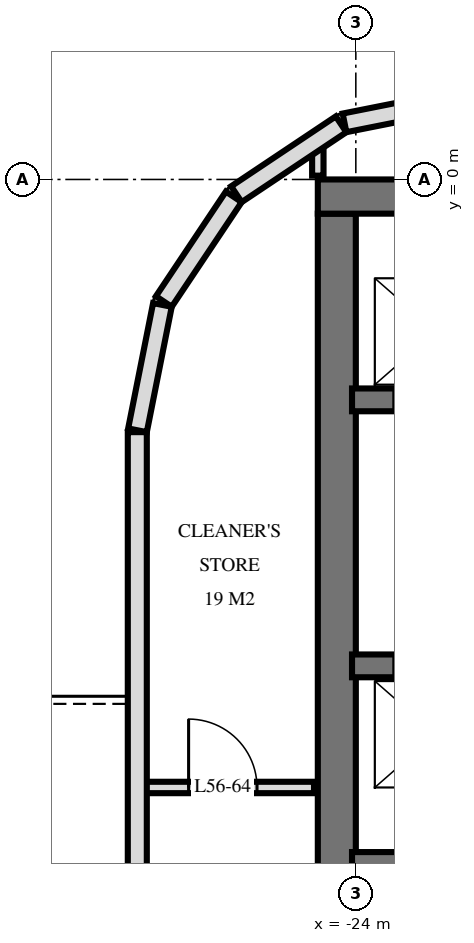
"""IFC4 building model, lengths in metres.
Left out: names, types, materials, properties, quantities, classifications, styles, units other than length and angle.
Written with IfcOpenShell. Run it as: python <this file> out.ifc"""

import sys

from ifc_helpers import new_model, si_unit, direction, frame, frame_2d, origin, place, context, subcontext, project, spatial, rectangle, extrude, element, fill, save


model = new_model("IFC4")
c1 = context("Model", 3, precision=1e-05, world=origin(), true_north=direction((0.0, 1.0)))
c2 = subcontext(c1, "Body", "Model", "MODEL_VIEW")
j1 = project(units=[si_unit("LENGTHUNIT", "METRE"), si_unit("PLANEANGLEUNIT", "RADIAN")], contexts=[c1])
p1 = place(None, origin())
s1 = spatial("IfcSite", under=j1, at=p1, CompositionType="ELEMENT")
p2 = place(p1, origin())
s2 = spatial("IfcBuilding", under=s1, at=p2, CompositionType="ELEMENT")
p3 = place(p2, frame((0.0, 0.0, 215.1)))
s3 = spatial("IfcBuildingStorey", under=s2, at=p3, CompositionType="ELEMENT", Elevation=215.1)
p4 = place(p3, frame((-24.5, -0.225, 0.0), z_axis=(0.0, 0.0, 1.0), x_axis=(1.0, 0.0, 0.0)))
e1 = element("IfcWall", 1, at=p4, inside=s3, PredefinedType="SHEAR", context=c2, shape_type="SweptSolid", body=[
    extrude(rectangle(XDim=14.5, YDim=0.45, at=frame_2d((7.25, 0.0))), origin(), (0.0, 0.0, 1.0), 3.5),
])
p5 = place(p3, frame((-24.25, -14.55, 0.0), z_axis=(0.0, 0.0, 1.0), x_axis=(0.0, 1.0, 0.0)))
e2 = element("IfcWall", 2, at=p5, inside=s3, PredefinedType="SHEAR", context=c2, shape_type="SweptSolid", body=[
    extrude(rectangle(XDim=14.1, YDim=0.5, at=frame_2d((7.05, 0.0))), origin(), (0.0, 0.0, 1.0), 3.5),
])
p6 = place(p3, frame((-24.05, -2.9, 0.0), z_axis=(0.0, 0.0, 1.0), x_axis=(1.0, 0.0, 0.0)))
e3 = element("IfcWall", 3, at=p6, inside=s3, PredefinedType="SHEAR", context=c2, shape_type="SweptSolid", body=[
    extrude(rectangle(XDim=13.7, YDim=0.3, at=frame_2d((6.85, 0.0))), origin(), (0.0, 0.0, 1.0), 3.5),
])
p7 = place(p6, frame((0.55, 0.0, 0.0)))
e4 = element("IfcOpeningElement", 4, at=p7, cuts=e3, PredefinedType="OPENING", context=c2, shape_type="SweptSolid", body=[
    extrude(rectangle(XDim=1.1, YDim=2.1, at=frame_2d((0.55, 1.05))), frame((0.0, 0.16, 0.0), z_axis=(0.0, -1.0, 0.0), x_axis=(1.0, 0.0, 0.0)), (0.0, 0.0, 1.0), 0.32),
])
p8 = place(p6, frame((6.863, 0.0, 0.0)))
e5 = element("IfcOpeningElement", 5, at=p8, cuts=e3, PredefinedType="OPENING", context=c2, shape_type="SweptSolid", body=[
    extrude(rectangle(XDim=0.9, YDim=2.1, at=frame_2d((0.45, 1.05))), frame((0.0, 0.16, 0.0), z_axis=(0.0, -1.0, 0.0), x_axis=(1.0, 0.0, 0.0)), (0.0, 0.0, 1.0), 0.32),
])
p9 = place(p6, frame((5.438, 0.0, 0.0)))
e6 = element("IfcOpeningElement", 6, at=p9, cuts=e3, PredefinedType="OPENING", context=c2, shape_type="SweptSolid", body=[
    extrude(rectangle(XDim=0.9, YDim=2.1, at=frame_2d((0.45, 1.05))), frame((0.0, 0.16, 0.0), z_axis=(0.0, -1.0, 0.0), x_axis=(1.0, 0.0, 0.0)), (0.0, 0.0, 1.0), 0.32),
])
p10 = place(p6, frame((11.85, 0.0, 0.0)))
e7 = element("IfcOpeningElement", 7, at=p10, cuts=e3, PredefinedType="OPENING", context=c2, shape_type="SweptSolid", body=[
    extrude(rectangle(XDim=1.0, YDim=2.1, at=frame_2d((0.5, 1.05))), frame((0.0, 0.16, 0.0), z_axis=(0.0, -1.0, 0.0), x_axis=(1.0, 0.0, 0.0)), (0.0, 0.0, 1.0), 0.32),
])
p11 = place(p6, frame((9.562, 0.0, 0.0)))
e8 = element("IfcOpeningElement", 8, at=p11, cuts=e3, PredefinedType="OPENING", context=c2, shape_type="SweptSolid", body=[
    extrude(rectangle(XDim=1.0, YDim=2.1, at=frame_2d((0.5, 1.05))), frame((0.0, 0.16, 0.0), z_axis=(0.0, -1.0, 0.0), x_axis=(1.0, 0.0, 0.0)), (0.0, 0.0, 1.0), 0.32),
])
p12 = place(p6, frame((8.137, 0.0, 0.0)))
e9 = element("IfcOpeningElement", 9, at=p12, cuts=e3, PredefinedType="OPENING", context=c2, shape_type="SweptSolid", body=[
    extrude(rectangle(XDim=1.0, YDim=2.1, at=frame_2d((0.5, 1.05))), frame((0.0, 0.16, 0.0), z_axis=(0.0, -1.0, 0.0), x_axis=(1.0, 0.0, 0.0)), (0.0, 0.0, 1.0), 0.32),
])
p13 = place(p6, frame((3.0, 0.0, 0.0)))
e10 = element("IfcOpeningElement", 10, at=p13, cuts=e3, PredefinedType="OPENING", context=c2, shape_type="SweptSolid", body=[
    extrude(rectangle(XDim=1.0, YDim=2.1, at=frame_2d((0.5, 1.05))), frame((0.0, 0.16, 0.0), z_axis=(0.0, -1.0, 0.0), x_axis=(1.0, 0.0, 0.0)), (0.0, 0.0, 1.0), 0.32),
])
p14 = place(p3, frame((-24.05, -6.4, 0.0), z_axis=(0.0, 0.0, 1.0), x_axis=(1.0, 0.0, 0.0)))
e11 = element("IfcWall", 11, at=p14, inside=s3, PredefinedType="SHEAR", context=c2, shape_type="SweptSolid", body=[
    extrude(rectangle(XDim=13.7, YDim=0.3, at=frame_2d((6.85, 0.0))), origin(), (0.0, 0.0, 1.0), 3.5),
])
p15 = place(p14, frame((0.55, 0.0, 0.0)))
e12 = element("IfcOpeningElement", 12, at=p15, cuts=e11, PredefinedType="OPENING", context=c2, shape_type="SweptSolid", body=[
    extrude(rectangle(XDim=1.1, YDim=2.1, at=frame_2d((0.55, 1.05))), frame((0.0, 0.16, 0.0), z_axis=(0.0, -1.0, 0.0), x_axis=(1.0, 0.0, 0.0)), (0.0, 0.0, 1.0), 0.32),
])
p16 = place(p14, frame((5.8, 0.0, 0.0)))
e13 = element("IfcOpeningElement", 13, at=p16, cuts=e11, PredefinedType="OPENING", context=c2, shape_type="SweptSolid", body=[
    extrude(rectangle(XDim=1.1, YDim=2.1, at=frame_2d((0.55, 1.05))), frame((0.0, 0.16, 0.0), z_axis=(0.0, -1.0, 0.0), x_axis=(1.0, 0.0, 0.0)), (0.0, 0.0, 1.0), 0.32),
])
p17 = place(p3, frame((-24.05, -9.0, 0.0), z_axis=(0.0, 0.0, 1.0), x_axis=(1.0, 0.0, 0.0)))
e14 = element("IfcWall", 14, at=p17, inside=s3, PredefinedType="SHEAR", context=c2, shape_type="SweptSolid", body=[
    extrude(rectangle(XDim=13.7, YDim=0.3, at=frame_2d((6.85, 0.0))), origin(), (0.0, 0.0, 1.0), 3.5),
])
p18 = place(p17, frame((8.8, 0.0, 0.0)))
e15 = element("IfcOpeningElement", 15, at=p18, cuts=e14, PredefinedType="OPENING", context=c2, shape_type="SweptSolid", body=[
    extrude(rectangle(XDim=1.1, YDim=2.1, at=frame_2d((0.55, 1.05))), frame((0.0, 0.16, 0.0), z_axis=(0.0, -1.0, 0.0), x_axis=(1.0, 0.0, 0.0)), (0.0, 0.0, 1.0), 0.32),
])
p19 = place(p3, frame((-22.5, 1.073, 0.0), z_axis=(0.0, 0.0, 1.0), x_axis=(-0.980803419081, -0.194999110559, 0.0)))
e16 = element("IfcWall", 16, at=p19, inside=s3, PredefinedType="SOLIDWALL", context=c2, shape_type="SweptSolid", body=[
    extrude(rectangle(XDim=1.681, YDim=0.25, at=frame_2d((0.841, 0.0))), origin(), (0.0, 0.0, 1.0), 3.22),
])
for number, where, z_axis, x_axis in (
    (17, (-24.194, 0.726, 0.0), (0.0, 0.0, 1.0), (-0.831, -0.556, 0.0)),
    (18, (-25.606, -0.229, 0.0), (0.0, 0.0, 1.0), (-0.556, -0.831, 0.0)),
):
    element("IfcWall", number, at=place(p3, frame(where, z_axis=z_axis, x_axis=x_axis)), inside=s3, PredefinedType="SOLIDWALL", context=c2, shape_type="SweptSolid", body=[
        extrude(rectangle(XDim=1.656, YDim=0.25, at=frame_2d((0.828, 0.0))), origin(), (0.0, 0.0, 1.0), 3.22),
    ])
p20 = place(p3, frame((-26.545, -1.651, 0.0), z_axis=(0.0, 0.0, 1.0), x_axis=(-0.194999110559, -0.980803419081, 0.0)))
e19 = element("IfcWall", 19, at=p20, inside=s3, PredefinedType="SOLIDWALL", context=c2, shape_type="SweptSolid", body=[
    extrude(rectangle(XDim=1.681, YDim=0.25, at=frame_2d((0.841, 0.0))), origin(), (0.0, 0.0, 1.0), 3.22),
])
p21 = place(p3, frame((-26.875, -3.325, 0.0), z_axis=(0.0, 0.0, 1.0), x_axis=(0.0, -1.0, 0.0)))
e20 = element("IfcWall", 20, at=p21, inside=s3, PredefinedType="SOLIDWALL", context=c2, shape_type="SweptSolid", body=[
    extrude(rectangle(XDim=21.551, YDim=0.25, at=frame_2d((10.775, 0.0))), origin(), (0.0, 0.0, 1.0), 3.22),
])
p22 = place(p21, frame((7.275, 0.0, 0.0)))
e21 = element("IfcOpeningElement", 21, at=p22, cuts=e20, PredefinedType="OPENING", context=c2, shape_type="SweptSolid", body=[
    extrude(rectangle(XDim=1.8, YDim=2.4, at=frame_2d((0.9, 1.2))), frame((0.0, 0.135, 0.0), z_axis=(0.0, -1.0, 0.0), x_axis=(1.0, 0.0, 0.0)), (0.0, 0.0, 1.0), 0.27),
])
p23 = place(p21, frame((15.275, 0.0, 0.0)))
e22 = element("IfcOpeningElement", 22, at=p23, cuts=e20, PredefinedType="OPENING", context=c2, shape_type="SweptSolid", body=[
    extrude(rectangle(XDim=1.8, YDim=2.4, at=frame_2d((0.9, 1.2))), frame((0.0, 0.135, 0.0), z_axis=(0.0, -1.0, 0.0), x_axis=(1.0, 0.0, 0.0)), (0.0, 0.0, 1.0), 0.27),
])
p24 = place(p21, frame((18.875, 0.0, 0.0)))
e23 = element("IfcOpeningElement", 23, at=p24, cuts=e20, PredefinedType="OPENING", context=c2, shape_type="SweptSolid", body=[
    extrude(rectangle(XDim=1.8, YDim=2.4, at=frame_2d((0.9, 1.2))), frame((0.0, 0.135, 0.0), z_axis=(0.0, -1.0, 0.0), x_axis=(1.0, 0.0, 0.0)), (0.0, 0.0, 1.0), 0.27),
])
p25 = place(p3, frame((-24.5, 0.05, 0.0), z_axis=(0.0, 0.0, 1.0), x_axis=(0.0, 1.0, 0.0)))
e24 = element("IfcWall", 24, at=p25, inside=s3, PredefinedType="PARTITIONING", context=c2, shape_type="SweptSolid", body=[
    extrude(rectangle(XDim=0.405, YDim=0.15, at=frame_2d((0.203, 0.0))), origin(), (0.0, 0.0, 1.0), 3.22),
])
p26 = place(p3, frame((-26.82, -8.0, 0.0), z_axis=(0.0, 0.0, 1.0), x_axis=(1.0, 0.0, 0.0)))
e25 = element("IfcWall", 25, at=p26, inside=s3, PredefinedType="PLUMBINGWALL", context=c2, shape_type="SweptSolid", body=[
    extrude(rectangle(XDim=2.27, YDim=0.15, at=frame_2d((1.135, 0.0))), origin(), (0.0, 0.0, 1.0), 3.22),
])
p27 = place(p26, frame((0.62, 0.0, 0.0)))
e26 = element("IfcOpeningElement", 26, at=p27, cuts=e25, PredefinedType="OPENING", context=c2, shape_type="SweptSolid", body=[
    extrude(rectangle(XDim=0.9, YDim=2.1, at=frame_2d((0.45, 1.05))), frame((0.0, 0.085, 0.0), z_axis=(0.0, -1.0, 0.0), x_axis=(1.0, 0.0, 0.0)), (0.0, 0.0, 1.0), 0.17),
])
p28 = place(p27, origin())
e27 = element("IfcDoor", 27, at=p28, inside=s3, OperationType="SINGLE_SWING_RIGHT", PredefinedType="DOOR", context=c2, shape_type="SweptSolid", body=[
    extrude(rectangle(XDim=0.9, YDim=2.1, at=frame_2d((0.45, 1.05))), frame((0.0, 0.025, 0.0), z_axis=(0.0, -1.0, 0.0), x_axis=(1.0, 0.0, 0.0)), (0.0, 0.0, 1.0), 0.05),
])
fill(e26, e27)
save(model, sys.argv[1])
